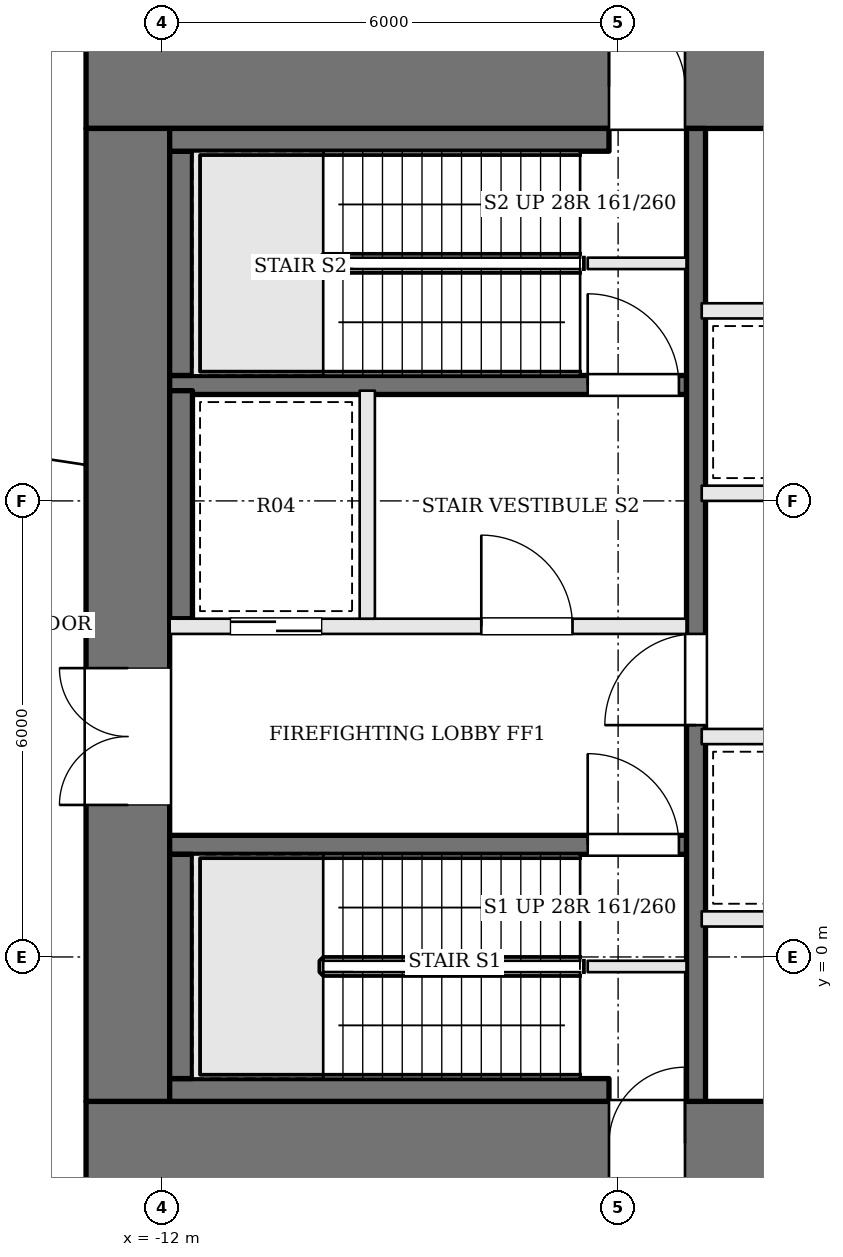
"""IFC4 building model, lengths in metres.
Left out: names, types, materials, properties, quantities, classifications, styles, units other than length and angle.
Written with IfcOpenShell. Run it as: python <this file> out.ifc"""

import sys

from ifc_helpers import new_model, si_unit, direction, frame, frame_2d, origin, place, context, subcontext, project, spatial, rectangle, extrude, element, fill, save


model = new_model("IFC4")
c1 = context("Model", 3, precision=1e-05, world=origin(), true_north=direction((0.0, 1.0)))
c2 = subcontext(c1, "Body", "Model", "MODEL_VIEW")
j1 = project(units=[si_unit("LENGTHUNIT", "METRE"), si_unit("PLANEANGLEUNIT", "RADIAN")], contexts=[c1])
p1 = place(None, origin())
s1 = spatial("IfcSite", under=j1, at=p1, CompositionType="ELEMENT")
p2 = place(p1, origin())
s2 = spatial("IfcBuilding", under=s1, at=p2, CompositionType="ELEMENT")
p3 = place(p2, frame((0.0, 0.0, 121.2)))
s3 = spatial("IfcBuildingStorey", under=s2, at=p3, CompositionType="ELEMENT", Elevation=121.2)
p4 = place(p3, frame((-13.0, 11.45, 0.0), z_axis=(0.0, 0.0, 1.0), x_axis=(1.0, 0.0, 0.0)))
e1 = element("IfcWall", 1, at=p4, inside=s3, PredefinedType="SHEAR", context=c2, shape_type="SweptSolid", body=[
    extrude(rectangle(XDim=26.0, YDim=1.1, at=frame_2d((13.0, 0.0))), origin(), (0.0, 0.0, 1.0), 4.5),
])
p5 = place(p4, frame((8.975, 0.0, 0.0)))
e2 = element("IfcOpeningElement", 2, at=p5, cuts=e1, PredefinedType="OPENING", context=c2, shape_type="SweptSolid", body=[
    extrude(rectangle(XDim=0.7, YDim=2.1, at=frame_2d((0.35, 1.05))), frame((0.0, 0.56, 0.0), z_axis=(0.0, -1.0, 0.0), x_axis=(1.0, 0.0, 0.0)), (0.0, 0.0, 1.0), 1.12),
])
p6 = place(p4, frame((11.575, 0.0, 0.0)))
e3 = element("IfcOpeningElement", 3, at=p6, cuts=e1, PredefinedType="OPENING", context=c2, shape_type="SweptSolid", body=[
    extrude(rectangle(XDim=1.2, YDim=2.1, at=frame_2d((0.6, 1.05))), frame((0.0, 0.56, 0.0), z_axis=(0.0, -1.0, 0.0), x_axis=(1.0, 0.0, 0.0)), (0.0, 0.0, 1.0), 1.12),
])
p7 = place(p4, frame((14.675, 0.0, 0.0)))
e4 = element("IfcOpeningElement", 4, at=p7, cuts=e1, PredefinedType="OPENING", context=c2, shape_type="SweptSolid", body=[
    extrude(rectangle(XDim=0.7, YDim=2.1, at=frame_2d((0.35, 1.05))), frame((0.0, 0.56, 0.0), z_axis=(0.0, -1.0, 0.0), x_axis=(1.0, 0.0, 0.0)), (0.0, 0.0, 1.0), 1.12),
])
p8 = place(p4, frame((16.725, 0.0, 0.0)))
e5 = element("IfcOpeningElement", 5, at=p8, cuts=e1, PredefinedType="OPENING", context=c2, shape_type="SweptSolid", body=[
    extrude(rectangle(XDim=0.7, YDim=2.1, at=frame_2d((0.35, 1.05))), frame((0.0, 0.56, 0.0), z_axis=(0.0, -1.0, 0.0), x_axis=(1.0, 0.0, 0.0)), (0.0, 0.0, 1.0), 1.12),
])
p9 = place(p4, frame((6.88, 0.0, 0.0)))
e6 = element("IfcOpeningElement", 6, at=p9, cuts=e1, PredefinedType="OPENING", context=c2, shape_type="SweptSolid", body=[
    extrude(rectangle(XDim=1.0, YDim=2.1, at=frame_2d((0.5, 1.05))), frame((0.0, 0.56, 0.0), z_axis=(0.0, -1.0, 0.0), x_axis=(1.0, 0.0, 0.0)), (0.0, 0.0, 1.0), 1.12),
])
p10 = place(p4, frame((18.12, 0.0, 0.0)))
e7 = element("IfcOpeningElement", 7, at=p10, cuts=e1, PredefinedType="OPENING", context=c2, shape_type="SweptSolid", body=[
    extrude(rectangle(XDim=1.0, YDim=2.1, at=frame_2d((0.5, 1.05))), frame((0.0, 0.56, 0.0), z_axis=(0.0, -1.0, 0.0), x_axis=(1.0, 0.0, 0.0)), (0.0, 0.0, 1.0), 1.12),
])
p11 = place(p3, frame((-13.0, -2.45, 0.0), z_axis=(0.0, 0.0, 1.0), x_axis=(1.0, 0.0, 0.0)))
e8 = element("IfcWall", 8, at=p11, inside=s3, PredefinedType="SHEAR", context=c2, shape_type="SweptSolid", body=[
    extrude(rectangle(XDim=26.0, YDim=1.1, at=frame_2d((13.0, 0.0))), origin(), (0.0, 0.0, 1.0), 4.5),
])
p12 = place(p11, frame((9.125, 0.0, 0.0)))
e9 = element("IfcOpeningElement", 9, at=p12, cuts=e8, PredefinedType="OPENING", context=c2, shape_type="SweptSolid", body=[
    extrude(rectangle(XDim=1.2, YDim=2.1, at=frame_2d((0.6, 1.05))), frame((0.0, 0.56, 0.0), z_axis=(0.0, -1.0, 0.0), x_axis=(1.0, 0.0, 0.0)), (0.0, 0.0, 1.0), 1.12),
])
p13 = place(p11, frame((12.375, 0.0, 0.0)))
e10 = element("IfcOpeningElement", 10, at=p13, cuts=e8, PredefinedType="OPENING", context=c2, shape_type="SweptSolid", body=[
    extrude(rectangle(XDim=1.2, YDim=2.1, at=frame_2d((0.6, 1.05))), frame((0.0, 0.56, 0.0), z_axis=(0.0, -1.0, 0.0), x_axis=(1.0, 0.0, 0.0)), (0.0, 0.0, 1.0), 1.12),
])
p14 = place(p11, frame((15.65, 0.0, 0.0)))
e11 = element("IfcOpeningElement", 11, at=p14, cuts=e8, PredefinedType="OPENING", context=c2, shape_type="SweptSolid", body=[
    extrude(rectangle(XDim=1.2, YDim=2.1, at=frame_2d((0.6, 1.05))), frame((0.0, 0.56, 0.0), z_axis=(0.0, -1.0, 0.0), x_axis=(1.0, 0.0, 0.0)), (0.0, 0.0, 1.0), 1.12),
])
p15 = place(p11, frame((6.88, 0.0, 0.0)))
e12 = element("IfcOpeningElement", 12, at=p15, cuts=e8, PredefinedType="OPENING", context=c2, shape_type="SweptSolid", body=[
    extrude(rectangle(XDim=1.0, YDim=2.1, at=frame_2d((0.5, 1.05))), frame((0.0, 0.56, 0.0), z_axis=(0.0, -1.0, 0.0), x_axis=(1.0, 0.0, 0.0)), (0.0, 0.0, 1.0), 1.12),
])
p16 = place(p11, frame((18.12, 0.0, 0.0)))
e13 = element("IfcOpeningElement", 13, at=p16, cuts=e8, PredefinedType="OPENING", context=c2, shape_type="SweptSolid", body=[
    extrude(rectangle(XDim=1.0, YDim=2.1, at=frame_2d((0.5, 1.05))), frame((0.0, 0.56, 0.0), z_axis=(0.0, -1.0, 0.0), x_axis=(1.0, 0.0, 0.0)), (0.0, 0.0, 1.0), 1.12),
])
p17 = place(p3, frame((-12.45, -1.9, 0.0), z_axis=(0.0, 0.0, 1.0), x_axis=(0.0, 1.0, 0.0)))
e14 = element("IfcWall", 14, at=p17, inside=s3, PredefinedType="SHEAR", context=c2, shape_type="SweptSolid", body=[
    extrude(rectangle(XDim=12.8, YDim=1.1, at=frame_2d((6.4, 0.0))), origin(), (0.0, 0.0, 1.0), 4.5),
])
p18 = place(p17, frame((3.9, 0.0, 0.0)))
e15 = element("IfcOpeningElement", 15, at=p18, cuts=e14, PredefinedType="OPENING", context=c2, shape_type="SweptSolid", body=[
    extrude(rectangle(XDim=1.8, YDim=2.1, at=frame_2d((0.9, 1.05))), frame((0.0, 0.56, 0.0), z_axis=(0.0, -1.0, 0.0), x_axis=(1.0, 0.0, 0.0)), (0.0, 0.0, 1.0), 1.12),
])
for number, where, z_axis, x_axis in (
    (16, (-6.4, -0.125, 0.0), (0.0, 0.0, 1.0), (1.0, 0.0, 0.0)),
    (17, (-6.4, 9.125, 0.0), (0.0, 0.0, 1.0), (1.0, 0.0, 0.0)),
):
    element("IfcWall", number, at=place(p3, frame(where, z_axis=z_axis, x_axis=x_axis)), inside=s3, PredefinedType="SOLIDWALL", context=c2, shape_type="SweptSolid", body=[
        extrude(rectangle(XDim=1.3, YDim=0.15, at=frame_2d((0.65, 0.0))), origin(), (0.0, 0.0, 1.0), 4.3),
    ])
p19 = place(p3, frame((-11.9, 1.475, 0.0), z_axis=(0.0, 0.0, 1.0), x_axis=(1.0, 0.0, 0.0)))
e18 = element("IfcWall", 18, at=p19, inside=s3, PredefinedType="SOLIDWALL", context=c2, shape_type="SweptSolid", body=[
    extrude(rectangle(XDim=6.8, YDim=0.25, at=frame_2d((3.4, 0.0))), origin(), (0.0, 0.0, 1.0), 4.3),
])
p20 = place(p19, frame((5.5, 0.0, 0.0)))
e19 = element("IfcOpeningElement", 19, at=p20, cuts=e18, PredefinedType="OPENING", context=c2, shape_type="SweptSolid", body=[
    extrude(rectangle(XDim=1.2, YDim=2.1, at=frame_2d((0.6, 1.05))), frame((0.0, 0.135, 0.0), z_axis=(0.0, -1.0, 0.0), x_axis=(1.0, 0.0, 0.0)), (0.0, 0.0, 1.0), 0.27),
])
p21 = place(p3, frame((-11.9, 4.35, 0.0), z_axis=(0.0, 0.0, 1.0), x_axis=(1.0, 0.0, 0.0)))
e20 = element("IfcWall", 20, at=p21, inside=s3, PredefinedType="SOLIDWALL", context=c2, shape_type="SweptSolid", body=[
    extrude(rectangle(XDim=6.8, YDim=0.2, at=frame_2d((3.4, 0.0))), origin(), (0.0, 0.0, 1.0), 4.3),
])
p22 = place(p21, frame((4.1, 0.0, 0.0)))
e21 = element("IfcOpeningElement", 21, at=p22, cuts=e20, PredefinedType="OPENING", context=c2, shape_type="SweptSolid", body=[
    extrude(rectangle(XDim=1.2, YDim=2.1, at=frame_2d((0.6, 1.05))), frame((0.0, 0.11, 0.0), z_axis=(0.0, -1.0, 0.0), x_axis=(1.0, 0.0, 0.0)), (0.0, 0.0, 1.0), 0.22),
])
p23 = place(p21, frame((0.8, 0.0, 0.0)))
e22 = element("IfcOpeningElement", 22, at=p23, cuts=e20, PredefinedType="OPENING", context=c2, shape_type="SweptSolid", body=[
    extrude(rectangle(XDim=1.2, YDim=2.1, at=frame_2d((0.6, 1.05))), frame((0.0, 0.11, 0.0), z_axis=(0.0, -1.0, 0.0), x_axis=(1.0, 0.0, 0.0)), (0.0, 0.0, 1.0), 0.22),
])
p24 = place(p3, frame((-11.9, 7.525, 0.0), z_axis=(0.0, 0.0, 1.0), x_axis=(1.0, 0.0, 0.0)))
e23 = element("IfcWall", 23, at=p24, inside=s3, PredefinedType="SOLIDWALL", context=c2, shape_type="SweptSolid", body=[
    extrude(rectangle(XDim=6.8, YDim=0.25, at=frame_2d((3.4, 0.0))), origin(), (0.0, 0.0, 1.0), 4.3),
])
p25 = place(p24, frame((5.5, 0.0, 0.0)))
e24 = element("IfcOpeningElement", 24, at=p25, cuts=e23, PredefinedType="OPENING", context=c2, shape_type="SweptSolid", body=[
    extrude(rectangle(XDim=1.2, YDim=2.1, at=frame_2d((0.6, 1.05))), frame((0.0, 0.135, 0.0), z_axis=(0.0, -1.0, 0.0), x_axis=(1.0, 0.0, 0.0)), (0.0, 0.0, 1.0), 0.27),
])
p26 = place(p3, frame((-9.3, 4.45, 0.0), z_axis=(0.0, 0.0, 1.0), x_axis=(0.0, 1.0, 0.0)))
e25 = element("IfcWall", 25, at=p26, inside=s3, PredefinedType="SOLIDWALL", context=c2, shape_type="SweptSolid", body=[
    extrude(rectangle(XDim=3.0, YDim=0.2, at=frame_2d((1.5, 0.0))), origin(), (0.0, 0.0, 1.0), 4.3),
])
p27 = place(p3, frame((-4.975, -1.9, 0.0), z_axis=(0.0, 0.0, 1.0), x_axis=(0.0, 1.0, 0.0)))
e26 = element("IfcWall", 26, at=p27, inside=s3, PredefinedType="SOLIDWALL", context=c2, shape_type="SweptSolid", body=[
    extrude(rectangle(XDim=12.8, YDim=0.25, at=frame_2d((6.4, 0.0))), origin(), (0.0, 0.0, 1.0), 4.3),
])
p28 = place(p27, frame((4.95, 0.0, 0.0)))
e27 = element("IfcOpeningElement", 27, at=p28, cuts=e26, PredefinedType="OPENING", context=c2, shape_type="SweptSolid", body=[
    extrude(rectangle(XDim=1.2, YDim=2.1, at=frame_2d((0.6, 1.05))), frame((0.0, 0.135, 0.0), z_axis=(0.0, -1.0, 0.0), x_axis=(1.0, 0.0, 0.0)), (0.0, 0.0, 1.0), 0.27),
])
p29 = place(p3, frame((-11.9, -1.75, 0.0), z_axis=(0.0, 0.0, 1.0), x_axis=(1.0, 0.0, 0.0)))
e28 = element("IfcWall", 28, at=p29, inside=s3, PredefinedType="SOLIDWALL", context=c2, shape_type="SweptSolid", body=[
    extrude(rectangle(XDim=5.78, YDim=0.3, at=frame_2d((2.89, 0.0))), origin(), (0.0, 0.0, 1.0), 4.3),
])
p30 = place(p3, frame((-11.75, -1.6, 0.0), z_axis=(0.0, 0.0, 1.0), x_axis=(0.0, 1.0, 0.0)))
e29 = element("IfcWall", 29, at=p30, inside=s3, PredefinedType="SOLIDWALL", context=c2, shape_type="SweptSolid", body=[
    extrude(rectangle(XDim=2.95, YDim=0.3, at=frame_2d((1.475, 0.0))), origin(), (0.0, 0.0, 1.0), 4.3),
])
p31 = place(p3, frame((-11.75, 4.45, 0.0), z_axis=(0.0, 0.0, 1.0), x_axis=(0.0, 1.0, 0.0)))
e30 = element("IfcWall", 30, at=p31, inside=s3, PredefinedType="SOLIDWALL", context=c2, shape_type="SweptSolid", body=[
    extrude(rectangle(XDim=3.0, YDim=0.3, at=frame_2d((1.5, 0.0))), origin(), (0.0, 0.0, 1.0), 4.3),
])
p32 = place(p3, frame((-11.75, 7.65, 0.0), z_axis=(0.0, 0.0, 1.0), x_axis=(0.0, 1.0, 0.0)))
e31 = element("IfcWall", 31, at=p32, inside=s3, PredefinedType="SOLIDWALL", context=c2, shape_type="SweptSolid", body=[
    extrude(rectangle(XDim=2.95, YDim=0.3, at=frame_2d((1.475, 0.0))), origin(), (0.0, 0.0, 1.0), 4.3),
])
p33 = place(p3, frame((-11.9, 10.75, 0.0), z_axis=(0.0, 0.0, 1.0), x_axis=(1.0, 0.0, 0.0)))
e32 = element("IfcWall", 32, at=p33, inside=s3, PredefinedType="SOLIDWALL", context=c2, shape_type="SweptSolid", body=[
    extrude(rectangle(XDim=5.78, YDim=0.3, at=frame_2d((2.89, 0.0))), origin(), (0.0, 0.0, 1.0), 4.3),
])
for number, where, z_axis, x_axis in (
    (33, (-4.9, 0.5, 0.0), (0.0, 0.0, 1.0), (1.0, 0.0, 0.0)),
    (34, (-4.9, 2.9, 0.0), (0.0, 0.0, 1.0), (1.0, 0.0, 0.0)),
    (35, (-4.9, 6.1, 0.0), (0.0, 0.0, 1.0), (1.0, 0.0, 0.0)),
    (36, (-4.9, 8.5, 0.0), (0.0, 0.0, 1.0), (1.0, 0.0, 0.0)),
):
    element("IfcWall", number, at=place(p3, frame(where, z_axis=z_axis, x_axis=x_axis)), inside=s3, PredefinedType="SOLIDWALL", context=c2, shape_type="SweptSolid", body=[
        extrude(rectangle(XDim=9.8, YDim=0.2, at=frame_2d((4.9, 0.0))), origin(), (0.0, 0.0, 1.0), 4.3),
    ])
p34 = place(p18, origin())
e37 = element("IfcDoor", 37, at=p34, inside=s3, OperationType="DOUBLE_DOOR_SINGLE_SWING", PredefinedType="DOOR", context=c2, shape_type="SweptSolid", body=[
    extrude(rectangle(XDim=1.8, YDim=2.1, at=frame_2d((0.9, 1.05))), frame((0.0, 0.025, 0.0), z_axis=(0.0, -1.0, 0.0), x_axis=(1.0, 0.0, 0.0)), (0.0, 0.0, 1.0), 0.05),
])
fill(e15, e37)
p35 = place(p28, origin())
e38 = element("IfcDoor", 38, at=p35, inside=s3, OperationType="SINGLE_SWING_LEFT", PredefinedType="DOOR", context=c2, shape_type="SweptSolid", body=[
    extrude(rectangle(XDim=1.2, YDim=2.1, at=frame_2d((0.6, 1.05))), frame((0.0, 0.025, 0.0), z_axis=(0.0, -1.0, 0.0), x_axis=(1.0, 0.0, 0.0)), (0.0, 0.0, 1.0), 0.05),
])
fill(e27, e38)
p36 = place(p22, origin())
e39 = element("IfcDoor", 39, at=p36, inside=s3, OperationType="SINGLE_SWING_LEFT", PredefinedType="DOOR", context=c2, shape_type="SweptSolid", body=[
    extrude(rectangle(XDim=1.2, YDim=2.1, at=frame_2d((0.6, 1.05))), frame((0.0, 0.025, 0.0), z_axis=(0.0, -1.0, 0.0), x_axis=(1.0, 0.0, 0.0)), (0.0, 0.0, 1.0), 0.05),
])
fill(e21, e39)
p37 = place(p20, origin())
e40 = element("IfcDoor", 40, at=p37, inside=s3, OperationType="SINGLE_SWING_LEFT", PredefinedType="DOOR", context=c2, shape_type="SweptSolid", body=[
    extrude(rectangle(XDim=1.2, YDim=2.1, at=frame_2d((0.6, 1.05))), frame((0.0, 0.025, 0.0), z_axis=(0.0, -1.0, 0.0), x_axis=(1.0, 0.0, 0.0)), (0.0, 0.0, 1.0), 0.05),
])
fill(e19, e40)
p38 = place(p25, origin())
e41 = element("IfcDoor", 41, at=p38, inside=s3, OperationType="SINGLE_SWING_LEFT", PredefinedType="DOOR", context=c2, shape_type="SweptSolid", body=[
    extrude(rectangle(XDim=1.2, YDim=2.1, at=frame_2d((0.6, 1.05))), frame((0.0, 0.025, 0.0), z_axis=(0.0, -1.0, 0.0), x_axis=(1.0, 0.0, 0.0)), (0.0, 0.0, 1.0), 0.05),
])
fill(e24, e41)
p39 = place(p23, origin())
e42 = element("IfcDoor", 42, at=p39, inside=s3, OperationType="SLIDING_TO_RIGHT", PredefinedType="DOOR", context=c2, shape_type="SweptSolid", body=[
    extrude(rectangle(XDim=1.2, YDim=2.1, at=frame_2d((0.6, 1.05))), frame((0.0, 0.025, 0.0), z_axis=(0.0, -1.0, 0.0), x_axis=(1.0, 0.0, 0.0)), (0.0, 0.0, 1.0), 0.05),
])
fill(e22, e42)
p40 = place(p15, origin())
e43 = element("IfcDoor", 43, at=p40, inside=s3, OperationType="SINGLE_SWING_RIGHT", PredefinedType="DOOR", context=c2, shape_type="SweptSolid", body=[
    extrude(rectangle(XDim=1.0, YDim=2.1, at=frame_2d((0.5, 1.05))), frame((0.0, 0.025, 0.0), z_axis=(0.0, -1.0, 0.0), x_axis=(1.0, 0.0, 0.0)), (0.0, 0.0, 1.0), 0.05),
])
fill(e12, e43)
p41 = place(p9, origin())
e44 = element("IfcDoor", 44, at=p41, inside=s3, OperationType="SINGLE_SWING_LEFT", PredefinedType="DOOR", context=c2, shape_type="SweptSolid", body=[
    extrude(rectangle(XDim=1.0, YDim=2.1, at=frame_2d((0.5, 1.05))), frame((0.0, 0.025, 0.0), z_axis=(0.0, -1.0, 0.0), x_axis=(1.0, 0.0, 0.0)), (0.0, 0.0, 1.0), 0.05),
])
fill(e6, e44)
save(model, sys.argv[1])
